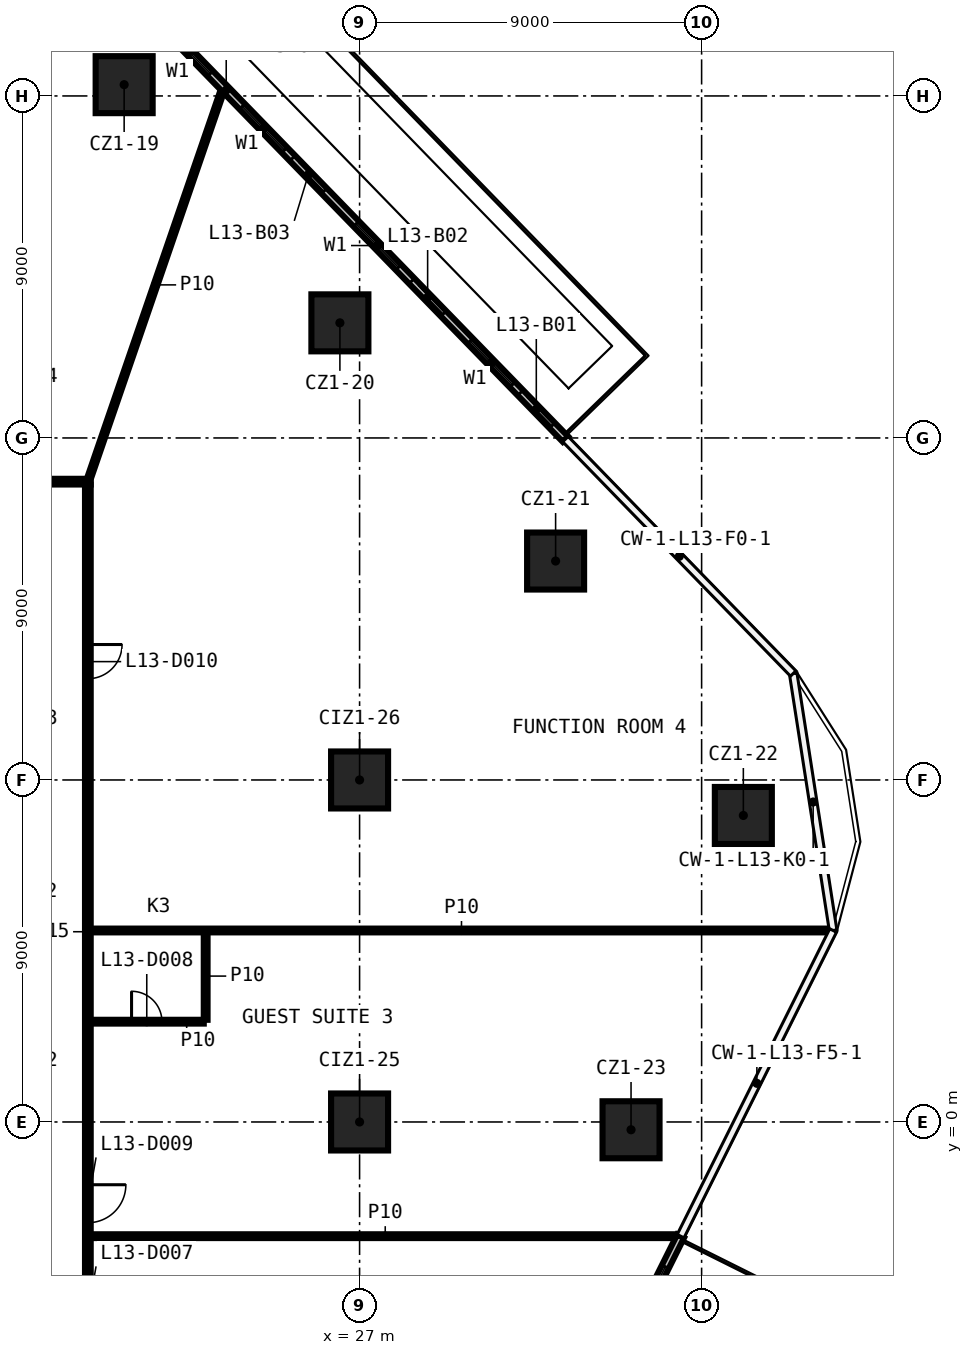
"""IFC4 building model, lengths in metres.
Left out: names, types, materials, properties, quantities, classifications, styles, units other than length and angle.
Written with IfcOpenShell. Run it as: python <this file> out.ifc"""

import sys

from ifc_helpers import new_model, si_unit, direction, frame, frame_2d, origin, origin_2d, place, context, subcontext, project, spatial, rectangle, extrude, element, fill, save


model = new_model("IFC4")
c1 = context("Model", 3, precision=1e-05, world=origin(), true_north=direction((0.0, 1.0)))
c2 = subcontext(c1, "Body", "Model", "MODEL_VIEW")
j1 = project(units=[si_unit("LENGTHUNIT", "METRE"), si_unit("PLANEANGLEUNIT", "RADIAN")], contexts=[c1])
p1 = place(None, origin())
s1 = spatial("IfcSite", under=j1, at=p1, CompositionType="ELEMENT")
p2 = place(p1, origin())
s2 = spatial("IfcBuilding", under=s1, at=p2, CompositionType="ELEMENT")
p3 = place(p2, frame((0.0, 0.0, 69.9)))
s3 = spatial("IfcBuildingStorey", under=s2, at=p3, CompositionType="ELEMENT", Elevation=69.9)
for number, where, z_axis, x_axis in (
    (1, (20.805, 27.297, 0.0), (0.0, 0.0, 1.0), (1.0, 0.0, 0.0)),
    (2, (26.482, 21.029, 0.0), (0.0, 0.0, 1.0), (1.0, 0.0, 0.0)),
    (3, (32.158, 14.761, 0.0), (0.0, 0.0, 1.0), (1.0, 0.0, 0.0)),
    (4, (37.098, 8.066, 0.0), (0.0, 0.0, 1.0), (1.0, 0.0, 0.0)),
    (5, (34.143, -0.205, 0.0), (0.0, 0.0, 1.0), (1.0, 0.0, 0.0)),
    (6, (27.0, 0.0, 0.0), (0.0, 0.0, 1.0), (1.0, 0.0, 0.0)),
    (7, (27.0, 9.0, 0.0), (0.0, 0.0, 1.0), (1.0, 0.0, 0.0)),
):
    element("IfcColumn", number, at=place(p3, frame(where, z_axis=z_axis, x_axis=x_axis)), inside=s3, PredefinedType="COLUMN", context=c2, shape_type="SweptSolid", body=[
        extrude(rectangle(XDim=1.5, YDim=1.5, at=origin_2d()), origin(), (0.0, 0.0, 1.0), 3.3),
    ])
p4 = place(p3, frame((19.925, -3.005, 0.0), z_axis=(0.0, 0.0, 1.0), x_axis=(1.0, 0.0, 0.0)))
e8 = element("IfcWall", 8, at=p4, inside=s3, PredefinedType="PARTITIONING", context=c2, shape_type="SweptSolid", body=[
    extrude(rectangle(XDim=15.5, YDim=0.1, at=frame_2d((7.75, 0.0))), origin(), (0.0, 0.0, 1.0), 3.3),
])
p5 = place(p3, frame((19.925, 2.639, 0.0), z_axis=(0.0, 0.0, 1.0), x_axis=(1.0, 0.0, 0.0)))
e9 = element("IfcWall", 9, at=p5, inside=s3, PredefinedType="PARTITIONING", context=c2, shape_type="SweptSolid", body=[
    extrude(rectangle(XDim=2.975, YDim=0.1, at=frame_2d((1.487, 0.0))), origin(), (0.0, 0.0, 1.0), 3.3),
])
p6 = place(p5, frame((1.075, 0.0, 0.0)))
e10 = element("IfcOpeningElement", 10, at=p6, cuts=e9, PredefinedType="OPENING", context=c2, shape_type="SweptSolid", body=[
    extrude(rectangle(XDim=0.8, YDim=2.1, at=frame_2d((0.4, 1.05))), frame((0.0, 0.06, 0.0), z_axis=(0.0, -1.0, 0.0), x_axis=(1.0, 0.0, 0.0)), (0.0, 0.0, 1.0), 0.12),
])
p7 = place(p3, frame((19.925, 5.039, 0.0), z_axis=(0.0, 0.0, 1.0), x_axis=(1.0, 0.0, 0.0)))
e11 = element("IfcWall", 11, at=p7, inside=s3, PredefinedType="PARTITIONING", context=c2, shape_type="SweptSolid", body=[
    extrude(rectangle(XDim=19.513, YDim=0.1, at=frame_2d((9.757, 0.0))), origin(), (0.0, 0.0, 1.0), 3.3),
])
p8 = place(p3, frame((-19.925, 16.85, 0.0), z_axis=(0.0, 0.0, 1.0), x_axis=(1.0, 0.0, 0.0)))
e12 = element("IfcWall", 12, at=p8, inside=s3, PredefinedType="PARTITIONING", context=c2, shape_type="SweptSolid", body=[
    extrude(rectangle(XDim=39.85, YDim=0.15, at=frame_2d((19.925, 0.0))), origin(), (0.0, 0.0, 1.0), 3.3),
])
p9 = place(p8, frame((31.436, 0.0, 0.0)))
e13 = element("IfcOpeningElement", 13, at=p9, cuts=e12, PredefinedType="OPENING", context=c2, shape_type="SweptSolid", body=[
    extrude(rectangle(XDim=0.9, YDim=2.1, at=frame_2d((0.45, 1.05))), frame((0.0, 0.085, 0.0), z_axis=(0.0, -1.0, 0.0), x_axis=(1.0, 0.0, 0.0)), (0.0, 0.0, 1.0), 0.17),
])
p10 = place(p8, frame((16.954, 0.0, 0.0)))
e14 = element("IfcOpeningElement", 14, at=p10, cuts=e12, PredefinedType="OPENING", context=c2, shape_type="SweptSolid", body=[
    extrude(rectangle(XDim=0.9, YDim=2.1, at=frame_2d((0.45, 1.05))), frame((0.0, 0.085, 0.0), z_axis=(0.0, -1.0, 0.0), x_axis=(1.0, 0.0, 0.0)), (0.0, 0.0, 1.0), 0.17),
])
p11 = place(p8, frame((7.208, 0.0, 0.0)))
e15 = element("IfcOpeningElement", 15, at=p11, cuts=e12, PredefinedType="OPENING", context=c2, shape_type="SweptSolid", body=[
    extrude(rectangle(XDim=0.9, YDim=2.1, at=frame_2d((0.45, 1.05))), frame((0.0, 0.085, 0.0), z_axis=(0.0, -1.0, 0.0), x_axis=(1.0, 0.0, 0.0)), (0.0, 0.0, 1.0), 0.17),
])
p12 = place(p3, frame((19.85, 16.85, 0.0), z_axis=(0.0, 0.0, 1.0), x_axis=(0.32525482398, 0.94562640587, 0.0)))
e16 = element("IfcWall", 16, at=p12, inside=s3, PredefinedType="PARTITIONING", context=c2, shape_type="SweptSolid", body=[
    extrude(rectangle(XDim=10.952, YDim=0.1, at=frame_2d((5.476, 0.0))), origin(), (0.0, 0.0, 1.0), 3.3),
])
p13 = place(p3, frame((22.95, 2.689, 0.0), z_axis=(0.0, 0.0, 1.0), x_axis=(0.0, 1.0, 0.0)))
e17 = element("IfcWall", 17, at=p13, inside=s3, PredefinedType="PARTITIONING", context=c2, shape_type="SweptSolid", body=[
    extrude(rectangle(XDim=2.3, YDim=0.1, at=frame_2d((1.15, 0.0))), origin(), (0.0, 0.0, 1.0), 3.3),
])
p14 = place(p3, frame((19.85, 16.775, 0.0), z_axis=(0.0, 0.0, 1.0), x_axis=(0.0, -1.0, 0.0)))
e18 = element("IfcWall", 18, at=p14, inside=s3, PredefinedType="PARTITIONING", context=c2, shape_type="SweptSolid", body=[
    extrude(rectangle(XDim=33.55, YDim=0.15, at=frame_2d((16.775, 0.0))), origin(), (0.0, 0.0, 1.0), 3.3),
])
p15 = place(p14, frame((21.293, 0.0, 0.0)))
e19 = element("IfcOpeningElement", 19, at=p15, cuts=e18, PredefinedType="OPENING", context=c2, shape_type="SweptSolid", body=[
    extrude(rectangle(XDim=1.0, YDim=2.1, at=frame_2d((0.5, 1.05))), frame((0.0, 0.085, 0.0), z_axis=(0.0, -1.0, 0.0), x_axis=(1.0, 0.0, 0.0)), (0.0, 0.0, 1.0), 0.17),
])
p16 = place(p14, frame((18.427, 0.0, 0.0)))
e20 = element("IfcOpeningElement", 20, at=p16, cuts=e18, PredefinedType="OPENING", context=c2, shape_type="SweptSolid", body=[
    extrude(rectangle(XDim=1.0, YDim=2.1, at=frame_2d((0.5, 1.05))), frame((0.0, 0.085, 0.0), z_axis=(0.0, -1.0, 0.0), x_axis=(1.0, 0.0, 0.0)), (0.0, 0.0, 1.0), 0.17),
])
p17 = place(p14, frame((4.211, 0.0, 0.0)))
e21 = element("IfcOpeningElement", 21, at=p17, cuts=e18, PredefinedType="OPENING", context=c2, shape_type="SweptSolid", body=[
    extrude(rectangle(XDim=0.9, YDim=2.1, at=frame_2d((0.45, 1.05))), frame((0.0, 0.085, 0.0), z_axis=(0.0, -1.0, 0.0), x_axis=(1.0, 0.0, 0.0)), (0.0, 0.0, 1.0), 0.17),
])
p18 = place(p3, frame((32.417, 17.969, 0.0), z_axis=(0.0, 0.0, 1.0), x_axis=(-0.696878416696, 0.717189286272, 0.0)))
e22 = element("IfcWall", 22, at=p18, inside=s3, PredefinedType="SOLIDWALL", context=c2, shape_type="SweptSolid", body=[
    extrude(rectangle(XDim=21.516, YDim=0.2, at=frame_2d((10.758, 0.0))), origin(), (0.0, 0.0, 1.0), 3.3),
])
p19 = place(p18, frame((2.0, 0.0, 0.6)))
e23 = element("IfcOpeningElement", 23, at=p19, cuts=e22, PredefinedType="OPENING", context=c2, shape_type="SweptSolid", body=[
    extrude(rectangle(XDim=1.6, YDim=2.4, at=frame_2d((0.8, 1.2))), frame((0.0, 0.11, 0.0), z_axis=(0.0, -1.0, 0.0), x_axis=(1.0, 0.0, 0.0)), (0.0, 0.0, 1.0), 0.22),
])
p20 = place(p18, frame((0.5, 0.0, 0.0)))
e24 = element("IfcOpeningElement", 24, at=p20, cuts=e22, PredefinedType="OPENING", context=c2, shape_type="SweptSolid", body=[
    extrude(rectangle(XDim=1.2, YDim=2.4, at=frame_2d((0.6, 1.2))), frame((0.0, 0.11, 0.0), z_axis=(0.0, -1.0, 0.0), x_axis=(1.0, 0.0, 0.0)), (0.0, 0.0, 1.0), 0.22),
])
p21 = place(p18, frame((6.303, 0.0, 0.6)))
e25 = element("IfcOpeningElement", 25, at=p21, cuts=e22, PredefinedType="OPENING", context=c2, shape_type="SweptSolid", body=[
    extrude(rectangle(XDim=1.6, YDim=2.4, at=frame_2d((0.8, 1.2))), frame((0.0, 0.11, 0.0), z_axis=(0.0, -1.0, 0.0), x_axis=(1.0, 0.0, 0.0)), (0.0, 0.0, 1.0), 0.22),
])
p22 = place(p18, frame((4.603, 0.0, 0.0)))
e26 = element("IfcOpeningElement", 26, at=p22, cuts=e22, PredefinedType="OPENING", context=c2, shape_type="SweptSolid", body=[
    extrude(rectangle(XDim=1.2, YDim=2.4, at=frame_2d((0.6, 1.2))), frame((0.0, 0.11, 0.0), z_axis=(0.0, -1.0, 0.0), x_axis=(1.0, 0.0, 0.0)), (0.0, 0.0, 1.0), 0.22),
])
p23 = place(p18, frame((10.606, 0.0, 0.6)))
e27 = element("IfcOpeningElement", 27, at=p23, cuts=e22, PredefinedType="OPENING", context=c2, shape_type="SweptSolid", body=[
    extrude(rectangle(XDim=1.6, YDim=2.4, at=frame_2d((0.8, 1.2))), frame((0.0, 0.11, 0.0), z_axis=(0.0, -1.0, 0.0), x_axis=(1.0, 0.0, 0.0)), (0.0, 0.0, 1.0), 0.22),
])
p24 = place(p18, frame((9.106, 0.0, 0.0)))
e28 = element("IfcOpeningElement", 28, at=p24, cuts=e22, PredefinedType="OPENING", context=c2, shape_type="SweptSolid", body=[
    extrude(rectangle(XDim=1.2, YDim=2.4, at=frame_2d((0.6, 1.2))), frame((0.0, 0.11, 0.0), z_axis=(0.0, -1.0, 0.0), x_axis=(1.0, 0.0, 0.0)), (0.0, 0.0, 1.0), 0.22),
])
p25 = place(p18, frame((13.41, 0.0, 0.6)))
e29 = element("IfcOpeningElement", 29, at=p25, cuts=e22, PredefinedType="OPENING", context=c2, shape_type="SweptSolid", body=[
    extrude(rectangle(XDim=1.6, YDim=2.4, at=frame_2d((0.8, 1.2))), frame((0.0, 0.11, 0.0), z_axis=(0.0, -1.0, 0.0), x_axis=(1.0, 0.0, 0.0)), (0.0, 0.0, 1.0), 0.22),
])
p26 = place(p18, frame((15.51, 0.0, 0.0)))
e30 = element("IfcOpeningElement", 30, at=p26, cuts=e22, PredefinedType="OPENING", context=c2, shape_type="SweptSolid", body=[
    extrude(rectangle(XDim=1.2, YDim=2.4, at=frame_2d((0.6, 1.2))), frame((0.0, 0.11, 0.0), z_axis=(0.0, -1.0, 0.0), x_axis=(1.0, 0.0, 0.0)), (0.0, 0.0, 1.0), 0.22),
])
p27 = place(p18, frame((19.213, 0.0, 0.6)))
e31 = element("IfcOpeningElement", 31, at=p27, cuts=e22, PredefinedType="OPENING", context=c2, shape_type="SweptSolid", body=[
    extrude(rectangle(XDim=1.6, YDim=2.4, at=frame_2d((0.8, 1.2))), frame((0.0, 0.11, 0.0), z_axis=(0.0, -1.0, 0.0), x_axis=(1.0, 0.0, 0.0)), (0.0, 0.0, 1.0), 0.22),
])
p28 = place(p18, frame((17.713, 0.0, 0.0)))
e32 = element("IfcOpeningElement", 32, at=p28, cuts=e22, PredefinedType="OPENING", context=c2, shape_type="SweptSolid", body=[
    extrude(rectangle(XDim=1.2, YDim=2.4, at=frame_2d((0.6, 1.2))), frame((0.0, 0.11, 0.0), z_axis=(0.0, -1.0, 0.0), x_axis=(1.0, 0.0, 0.0)), (0.0, 0.0, 1.0), 0.22),
])
p29 = place(p3, frame((23.394, -27.165, 0.0), z_axis=(0.0, 0.0, 1.0), x_axis=(0.446421309396, 0.894822895615, 0.0)))
e33 = element("IfcWall", 33, at=p29, inside=s3, PredefinedType="SOLIDWALL", context=c2, shape_type="SweptSolid", body=[
    extrude(rectangle(XDim=27.0, YDim=0.2, at=frame_2d((13.5, 0.0))), origin(), (0.0, 0.0, 1.0), 3.3),
])
p30 = place(p29, frame((0.5, 0.0, 0.6)))
e34 = element("IfcOpeningElement", 34, at=p30, cuts=e33, PredefinedType="OPENING", context=c2, shape_type="SweptSolid", body=[
    extrude(rectangle(XDim=1.6, YDim=2.4, at=frame_2d((0.8, 1.2))), frame((0.0, 0.11, 0.0), z_axis=(0.0, -1.0, 0.0), x_axis=(1.0, 0.0, 0.0)), (0.0, 0.0, 1.0), 0.22),
])
p31 = place(p29, frame((3.0, 0.0, 0.0)))
e35 = element("IfcOpeningElement", 35, at=p31, cuts=e33, PredefinedType="OPENING", context=c2, shape_type="SweptSolid", body=[
    extrude(rectangle(XDim=1.2, YDim=2.4, at=frame_2d((0.6, 1.2))), frame((0.0, 0.11, 0.0), z_axis=(0.0, -1.0, 0.0), x_axis=(1.0, 0.0, 0.0)), (0.0, 0.0, 1.0), 0.22),
])
p32 = place(p29, frame((6.5, 0.0, 0.6)))
e36 = element("IfcOpeningElement", 36, at=p32, cuts=e33, PredefinedType="OPENING", context=c2, shape_type="SweptSolid", body=[
    extrude(rectangle(XDim=1.6, YDim=2.4, at=frame_2d((0.8, 1.2))), frame((0.0, 0.11, 0.0), z_axis=(0.0, -1.0, 0.0), x_axis=(1.0, 0.0, 0.0)), (0.0, 0.0, 1.0), 0.22),
])
p33 = place(p29, frame((5.0, 0.0, 0.0)))
e37 = element("IfcOpeningElement", 37, at=p33, cuts=e33, PredefinedType="OPENING", context=c2, shape_type="SweptSolid", body=[
    extrude(rectangle(XDim=1.2, YDim=2.4, at=frame_2d((0.6, 1.2))), frame((0.0, 0.11, 0.0), z_axis=(0.0, -1.0, 0.0), x_axis=(1.0, 0.0, 0.0)), (0.0, 0.0, 1.0), 0.22),
])
p34 = place(p29, frame((9.5, 0.0, 0.6)))
e38 = element("IfcOpeningElement", 38, at=p34, cuts=e33, PredefinedType="OPENING", context=c2, shape_type="SweptSolid", body=[
    extrude(rectangle(XDim=1.6, YDim=2.4, at=frame_2d((0.8, 1.2))), frame((0.0, 0.11, 0.0), z_axis=(0.0, -1.0, 0.0), x_axis=(1.0, 0.0, 0.0)), (0.0, 0.0, 1.0), 0.22),
])
p35 = place(p29, frame((11.6, 0.0, 0.0)))
e39 = element("IfcOpeningElement", 39, at=p35, cuts=e33, PredefinedType="OPENING", context=c2, shape_type="SweptSolid", body=[
    extrude(rectangle(XDim=1.2, YDim=2.4, at=frame_2d((0.6, 1.2))), frame((0.0, 0.11, 0.0), z_axis=(0.0, -1.0, 0.0), x_axis=(1.0, 0.0, 0.0)), (0.0, 0.0, 1.0), 0.22),
])
p36 = place(p29, frame((15.5, 0.0, 0.6)))
e40 = element("IfcOpeningElement", 40, at=p36, cuts=e33, PredefinedType="OPENING", context=c2, shape_type="SweptSolid", body=[
    extrude(rectangle(XDim=1.6, YDim=2.4, at=frame_2d((0.8, 1.2))), frame((0.0, 0.11, 0.0), z_axis=(0.0, -1.0, 0.0), x_axis=(1.0, 0.0, 0.0)), (0.0, 0.0, 1.0), 0.22),
])
p37 = place(p29, frame((14.0, 0.0, 0.0)))
e41 = element("IfcOpeningElement", 41, at=p37, cuts=e33, PredefinedType="OPENING", context=c2, shape_type="SweptSolid", body=[
    extrude(rectangle(XDim=1.2, YDim=2.4, at=frame_2d((0.6, 1.2))), frame((0.0, 0.11, 0.0), z_axis=(0.0, -1.0, 0.0), x_axis=(1.0, 0.0, 0.0)), (0.0, 0.0, 1.0), 0.22),
])
p38 = place(p29, frame((20.0, 0.0, 0.6)))
e42 = element("IfcOpeningElement", 42, at=p38, cuts=e33, PredefinedType="OPENING", context=c2, shape_type="SweptSolid", body=[
    extrude(rectangle(XDim=1.6, YDim=2.4, at=frame_2d((0.8, 1.2))), frame((0.0, 0.11, 0.0), z_axis=(0.0, -1.0, 0.0), x_axis=(1.0, 0.0, 0.0)), (0.0, 0.0, 1.0), 0.22),
])
p39 = place(p29, frame((18.3, 0.0, 0.0)))
e43 = element("IfcOpeningElement", 43, at=p39, cuts=e33, PredefinedType="OPENING", context=c2, shape_type="SweptSolid", body=[
    extrude(rectangle(XDim=1.2, YDim=2.4, at=frame_2d((0.6, 1.2))), frame((0.0, 0.11, 0.0), z_axis=(0.0, -1.0, 0.0), x_axis=(1.0, 0.0, 0.0)), (0.0, 0.0, 1.0), 0.22),
])
p40 = place(p29, frame((24.5, 0.0, 0.6)))
e44 = element("IfcOpeningElement", 44, at=p40, cuts=e33, PredefinedType="OPENING", context=c2, shape_type="SweptSolid", body=[
    extrude(rectangle(XDim=1.6, YDim=2.4, at=frame_2d((0.8, 1.2))), frame((0.0, 0.11, 0.0), z_axis=(0.0, -1.0, 0.0), x_axis=(1.0, 0.0, 0.0)), (0.0, 0.0, 1.0), 0.22),
])
p41 = place(p29, frame((23.0, 0.0, 0.0)))
e45 = element("IfcOpeningElement", 45, at=p41, cuts=e33, PredefinedType="OPENING", context=c2, shape_type="SweptSolid", body=[
    extrude(rectangle(XDim=1.2, YDim=2.4, at=frame_2d((0.6, 1.2))), frame((0.0, 0.11, 0.0), z_axis=(0.0, -1.0, 0.0), x_axis=(1.0, 0.0, 0.0)), (0.0, 0.0, 1.0), 0.22),
])
p42 = place(p6, origin())
e46 = element("IfcDoor", 46, at=p42, inside=s3, OperationType="SINGLE_SWING_RIGHT", PredefinedType="DOOR", context=c2, shape_type="SweptSolid", body=[
    extrude(rectangle(XDim=0.8, YDim=2.1, at=frame_2d((0.4, 1.05))), frame((0.0, 0.025, 0.0), z_axis=(0.0, -1.0, 0.0), x_axis=(1.0, 0.0, 0.0)), (0.0, 0.0, 1.0), 0.05),
])
fill(e10, e46)
p43 = place(p16, origin())
e47 = element("IfcDoor", 47, at=p43, inside=s3, OperationType="SINGLE_SWING_LEFT", PredefinedType="DOOR", context=c2, shape_type="SweptSolid", body=[
    extrude(rectangle(XDim=1.0, YDim=2.1, at=frame_2d((0.5, 1.05))), frame((0.0, 0.025, 0.0), z_axis=(0.0, -1.0, 0.0), x_axis=(1.0, 0.0, 0.0)), (0.0, 0.0, 1.0), 0.05),
])
fill(e20, e47)
p44 = place(p17, origin())
e48 = element("IfcDoor", 48, at=p44, inside=s3, OperationType="SINGLE_SWING_RIGHT", PredefinedType="DOOR", context=c2, shape_type="SweptSolid", body=[
    extrude(rectangle(XDim=0.9, YDim=2.1, at=frame_2d((0.45, 1.05))), frame((0.0, 0.025, 0.0), z_axis=(0.0, -1.0, 0.0), x_axis=(1.0, 0.0, 0.0)), (0.0, 0.0, 1.0), 0.05),
])
fill(e21, e48)
p45 = place(p19, origin())
e49 = element("IfcWindow", 49, at=p45, inside=s3, PartitioningType="SINGLE_PANEL", PredefinedType="WINDOW", context=c2, shape_type="SweptSolid", body=[
    extrude(rectangle(XDim=1.6, YDim=2.4, at=frame_2d((0.8, 1.2))), frame((0.0, 0.03, 0.0), z_axis=(0.0, -1.0, 0.0), x_axis=(1.0, 0.0, 0.0)), (0.0, 0.0, 1.0), 0.06),
])
fill(e23, e49)
p46 = place(p20, origin())
e50 = element("IfcDoor", 50, at=p46, inside=s3, OperationType="SLIDING_TO_LEFT", PredefinedType="DOOR", context=c2, shape_type="SweptSolid", body=[
    extrude(rectangle(XDim=1.2, YDim=2.4, at=frame_2d((0.6, 1.2))), frame((0.0, 0.025, 0.0), z_axis=(0.0, -1.0, 0.0), x_axis=(1.0, 0.0, 0.0)), (0.0, 0.0, 1.0), 0.05),
])
fill(e24, e50)
p47 = place(p21, origin())
e51 = element("IfcWindow", 51, at=p47, inside=s3, PartitioningType="SINGLE_PANEL", PredefinedType="WINDOW", context=c2, shape_type="SweptSolid", body=[
    extrude(rectangle(XDim=1.6, YDim=2.4, at=frame_2d((0.8, 1.2))), frame((0.0, 0.03, 0.0), z_axis=(0.0, -1.0, 0.0), x_axis=(1.0, 0.0, 0.0)), (0.0, 0.0, 1.0), 0.06),
])
fill(e25, e51)
p48 = place(p22, origin())
e52 = element("IfcDoor", 52, at=p48, inside=s3, OperationType="SLIDING_TO_LEFT", PredefinedType="DOOR", context=c2, shape_type="SweptSolid", body=[
    extrude(rectangle(XDim=1.2, YDim=2.4, at=frame_2d((0.6, 1.2))), frame((0.0, 0.025, 0.0), z_axis=(0.0, -1.0, 0.0), x_axis=(1.0, 0.0, 0.0)), (0.0, 0.0, 1.0), 0.05),
])
fill(e26, e52)
p49 = place(p23, origin())
e53 = element("IfcWindow", 53, at=p49, inside=s3, PartitioningType="SINGLE_PANEL", PredefinedType="WINDOW", context=c2, shape_type="SweptSolid", body=[
    extrude(rectangle(XDim=1.6, YDim=2.4, at=frame_2d((0.8, 1.2))), frame((0.0, 0.03, 0.0), z_axis=(0.0, -1.0, 0.0), x_axis=(1.0, 0.0, 0.0)), (0.0, 0.0, 1.0), 0.06),
])
fill(e27, e53)
p50 = place(p24, origin())
e54 = element("IfcDoor", 54, at=p50, inside=s3, OperationType="SLIDING_TO_LEFT", PredefinedType="DOOR", context=c2, shape_type="SweptSolid", body=[
    extrude(rectangle(XDim=1.2, YDim=2.4, at=frame_2d((0.6, 1.2))), frame((0.0, 0.025, 0.0), z_axis=(0.0, -1.0, 0.0), x_axis=(1.0, 0.0, 0.0)), (0.0, 0.0, 1.0), 0.05),
])
fill(e28, e54)
p51 = place(p25, origin())
e55 = element("IfcWindow", 55, at=p51, inside=s3, PartitioningType="SINGLE_PANEL", PredefinedType="WINDOW", context=c2, shape_type="SweptSolid", body=[
    extrude(rectangle(XDim=1.6, YDim=2.4, at=frame_2d((0.8, 1.2))), frame((0.0, 0.03, 0.0), z_axis=(0.0, -1.0, 0.0), x_axis=(1.0, 0.0, 0.0)), (0.0, 0.0, 1.0), 0.06),
])
fill(e29, e55)
p52 = place(p40, origin())
e56 = element("IfcWindow", 56, at=p52, inside=s3, PartitioningType="SINGLE_PANEL", PredefinedType="WINDOW", context=c2, shape_type="SweptSolid", body=[
    extrude(rectangle(XDim=1.6, YDim=2.4, at=frame_2d((0.8, 1.2))), frame((0.0, 0.03, 0.0), z_axis=(0.0, -1.0, 0.0), x_axis=(1.0, 0.0, 0.0)), (0.0, 0.0, 1.0), 0.06),
])
fill(e44, e56)
save(model, sys.argv[1])
